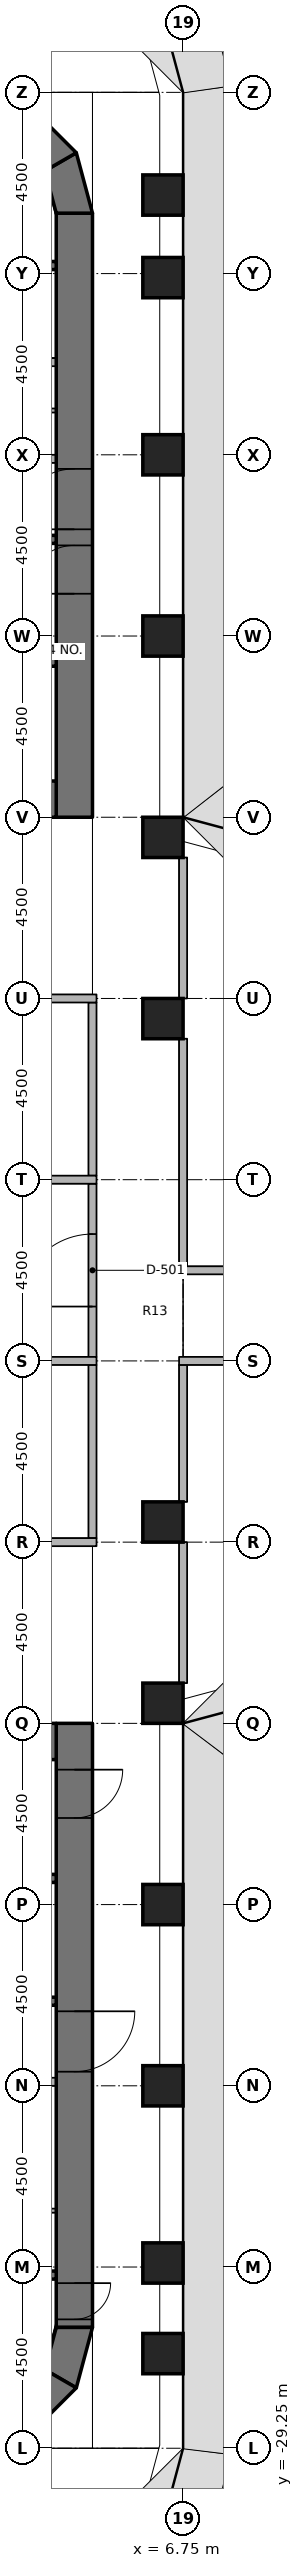
"""IFC4 building model, lengths in metres.
Left out: names, types, materials, properties, quantities, classifications, styles, units other than length and angle.
Written with IfcOpenShell. Run it as: python <this file> out.ifc"""

import sys

from ifc_helpers import new_model, si_unit, direction, frame, frame_2d, origin, origin_2d, place, context, subcontext, project, spatial, polyline, rectangle, outline, extrude, element, fill, save


model = new_model("IFC4")
c1 = context("Model", 3, precision=1e-05, world=origin(), true_north=direction((0.0, 1.0)))
c2 = subcontext(c1, "Body", "Model", "MODEL_VIEW")
j1 = project(units=[si_unit("LENGTHUNIT", "METRE"), si_unit("PLANEANGLEUNIT", "RADIAN")], contexts=[c1])
p1 = place(None, origin())
s1 = spatial("IfcSite", under=j1, at=p1, CompositionType="ELEMENT")
p2 = place(p1, origin())
s2 = spatial("IfcBuilding", under=s1, at=p2, CompositionType="ELEMENT")
p3 = place(p2, frame((0.0, 0.0, 69.0)))
s3 = spatial("IfcBuildingStorey", under=s2, at=p3, CompositionType="ELEMENT", Elevation=69.0)
for number, where, z_axis, x_axis in (
    (1, (6.25, -26.9, 0.0), (0.0, 0.0, 1.0), (1.0, 0.0, 0.0)),
    (2, (6.25, -24.65, 0.0), (0.0, 0.0, 1.0), (1.0, 0.0, 0.0)),
    (3, (6.25, -20.25, 0.0), (0.0, 0.0, 1.0), (1.0, 0.0, 0.0)),
    (4, (6.25, -15.75, 0.0), (0.0, 0.0, 1.0), (1.0, 0.0, 0.0)),
    (5, (6.25, -10.75, 0.0), (0.0, 0.0, 1.0), (1.0, 0.0, 0.0)),
    (6, (6.25, -6.25, 0.0), (0.0, 0.0, 1.0), (1.0, 0.0, 0.0)),
    (7, (6.25, 6.25, 0.0), (0.0, 0.0, 1.0), (1.0, 0.0, 0.0)),
    (8, (6.25, 10.75, 0.0), (0.0, 0.0, 1.0), (1.0, 0.0, 0.0)),
    (9, (6.25, 15.75, 0.0), (0.0, 0.0, 1.0), (1.0, 0.0, 0.0)),
    (10, (6.25, 20.25, 0.0), (0.0, 0.0, 1.0), (1.0, 0.0, 0.0)),
    (11, (6.25, 24.65, 0.0), (0.0, 0.0, 1.0), (1.0, 0.0, 0.0)),
    (12, (6.25, 26.7, 0.0), (0.0, 0.0, 1.0), (1.0, 0.0, 0.0)),
):
    element("IfcColumn", number, at=place(p3, frame(where, z_axis=z_axis, x_axis=x_axis)), inside=s3, PredefinedType="COLUMN", context=c2, shape_type="SweptSolid", body=[
        extrude(rectangle(XDim=1.0, YDim=1.0, at=origin_2d()), origin(), (0.0, 0.0, 1.0), 4.05),
    ])
p4 = place(p3, frame((4.05, 11.25, 0.0), z_axis=(0.0, 0.0, 1.0), x_axis=(0.0, 1.0, 0.0)))
e13 = element("IfcWall", 13, at=p4, inside=s3, PredefinedType="SHEAR", context=c2, shape_type="SweptSolid", body=[
    extrude(rectangle(XDim=15.0, YDim=0.9, at=frame_2d((7.5, 0.0))), origin(), (0.0, 0.0, 1.0), 4.2),
])
p5 = place(p4, frame((7.15, 0.0, 0.0)))
e14 = element("IfcOpeningElement", 14, at=p5, cuts=e13, PredefinedType="OPENING", context=c2, shape_type="SweptSolid", body=[
    extrude(rectangle(XDim=1.5, YDim=2.3, at=frame_2d((0.75, 1.15))), frame((0.0, 0.46, 0.0), z_axis=(0.0, -1.0, 0.0), x_axis=(1.0, 0.0, 0.0)), (0.0, 0.0, 1.0), 0.92),
])
p6 = place(p4, frame((5.55, 0.0, 0.0)))
e15 = element("IfcOpeningElement", 15, at=p6, cuts=e13, PredefinedType="OPENING", context=c2, shape_type="SweptSolid", body=[
    extrude(rectangle(XDim=1.2, YDim=2.1, at=frame_2d((0.6, 1.05))), frame((0.0, 0.46, 0.0), z_axis=(0.0, -1.0, 0.0), x_axis=(1.0, 0.0, 0.0)), (0.0, 0.0, 1.0), 0.92),
])
p7 = place(p3, frame((-3.6, 11.7, 0.0), z_axis=(0.0, 0.0, 1.0), x_axis=(1.0, 0.0, 0.0)))
e16 = element("IfcWall", 16, at=p7, inside=s3, PredefinedType="SHEAR", context=c2, shape_type="SweptSolid", body=[
    extrude(rectangle(XDim=7.2, YDim=0.9, at=frame_2d((3.6, 0.0))), origin(), (0.0, 0.0, 1.0), 4.2),
])
p8 = place(p3, origin())
e17 = element("IfcWall", 17, at=p8, inside=s3, PredefinedType="SHEAR", context=c2, shape_type="SweptSolid", body=[
    extrude(outline(polyline([(4.5, 26.25), (4.098, 27.75), (3.319, 27.3), (3.6, 26.25), (4.5, 26.25)])), origin(), (0.0, 0.0, 1.0), 4.2),
])
p9 = place(p3, origin())
e18 = element("IfcWall", 18, at=p9, inside=s3, PredefinedType="SHEAR", context=c2, shape_type="SweptSolid", body=[
    extrude(outline(polyline([(4.098, 27.75), (3.0, 28.848), (2.55, 28.069), (3.319, 27.3), (4.098, 27.75)])), origin(), (0.0, 0.0, 1.0), 4.2),
])
p10 = place(p3, frame((4.05, -11.25, 0.0), z_axis=(0.0, 0.0, 1.0), x_axis=(0.0, -1.0, 0.0)))
e19 = element("IfcWall", 19, at=p10, inside=s3, PredefinedType="SHEAR", context=c2, shape_type="SweptSolid", body=[
    extrude(rectangle(XDim=15.0, YDim=0.9, at=frame_2d((7.5, 0.0))), origin(), (0.0, 0.0, 1.0), 4.2),
])
p11 = place(p10, frame((7.15, 0.0, 0.0)))
e20 = element("IfcOpeningElement", 20, at=p11, cuts=e19, PredefinedType="OPENING", context=c2, shape_type="SweptSolid", body=[
    extrude(rectangle(XDim=1.5, YDim=2.3, at=frame_2d((0.75, 1.15))), frame((0.0, 0.46, 0.0), z_axis=(0.0, -1.0, 0.0), x_axis=(1.0, 0.0, 0.0)), (0.0, 0.0, 1.0), 0.92),
])
p12 = place(p10, frame((13.9, 0.0, 0.0)))
e21 = element("IfcOpeningElement", 21, at=p12, cuts=e19, PredefinedType="OPENING", context=c2, shape_type="SweptSolid", body=[
    extrude(rectangle(XDim=0.9, YDim=2.1, at=frame_2d((0.45, 1.05))), frame((0.0, 0.46, 0.0), z_axis=(0.0, -1.0, 0.0), x_axis=(1.0, 0.0, 0.0)), (0.0, 0.0, 1.0), 0.92),
])
p13 = place(p10, frame((1.15, 0.0, 0.0)))
e22 = element("IfcOpeningElement", 22, at=p13, cuts=e19, PredefinedType="OPENING", context=c2, shape_type="SweptSolid", body=[
    extrude(rectangle(XDim=1.2, YDim=2.1, at=frame_2d((0.6, 1.05))), frame((0.0, 0.46, 0.0), z_axis=(0.0, -1.0, 0.0), x_axis=(1.0, 0.0, 0.0)), (0.0, 0.0, 1.0), 0.92),
])
p14 = place(p3, frame((-3.6, -11.7, 0.0), z_axis=(0.0, 0.0, 1.0), x_axis=(1.0, 0.0, 0.0)))
e23 = element("IfcWall", 23, at=p14, inside=s3, PredefinedType="SHEAR", context=c2, shape_type="SweptSolid", body=[
    extrude(rectangle(XDim=7.2, YDim=0.9, at=frame_2d((3.6, 0.0))), origin(), (0.0, 0.0, 1.0), 4.2),
])
p15 = place(p3, origin())
e24 = element("IfcWall", 24, at=p15, inside=s3, PredefinedType="SHEAR", context=c2, shape_type="SweptSolid", body=[
    extrude(outline(polyline([(4.5, -26.25), (4.098, -27.75), (3.319, -27.3), (3.6, -26.25), (4.5, -26.25)])), origin(), (0.0, 0.0, 1.0), 4.2),
])
p16 = place(p3, origin())
e25 = element("IfcWall", 25, at=p16, inside=s3, PredefinedType="SHEAR", context=c2, shape_type="SweptSolid", body=[
    extrude(outline(polyline([(4.098, -27.75), (3.0, -28.848), (2.55, -28.069), (3.319, -27.3), (4.098, -27.75)])), origin(), (0.0, 0.0, 1.0), 4.2),
])
for number, where, z_axis, x_axis in (
    (26, (-3.6, 24.95, 0.0), (0.0, 0.0, 1.0), (1.0, 0.0, 0.0)),
    (27, (-3.6, 18.15, 0.0), (0.0, 0.0, 1.0), (1.0, 0.0, 0.0)),
    (28, (-3.6, 15.1, 0.0), (0.0, 0.0, 1.0), (1.0, 0.0, 0.0)),
):
    element("IfcWall", number, at=place(p3, frame(where, z_axis=z_axis, x_axis=x_axis)), inside=s3, PredefinedType="SHEAR", context=c2, shape_type="SweptSolid", body=[
        extrude(rectangle(XDim=7.2, YDim=0.2, at=frame_2d((3.6, 0.0))), origin(), (0.0, 0.0, 1.0), 4.05),
    ])
p17 = place(p3, frame((0.9, 20.15, 0.0), z_axis=(0.0, 0.0, 1.0), x_axis=(1.0, 0.0, 0.0)))
e29 = element("IfcWall", 29, at=p17, inside=s3, PredefinedType="PARTITIONING", context=c2, shape_type="SweptSolid", body=[
    extrude(rectangle(XDim=2.7, YDim=0.2, at=frame_2d((1.35, 0.0))), origin(), (0.0, 0.0, 1.0), 4.05),
])
p18 = place(p3, frame((1.1, 22.55, 0.0), z_axis=(0.0, 0.0, 1.0), x_axis=(1.0, 0.0, 0.0)))
e30 = element("IfcWall", 30, at=p18, inside=s3, PredefinedType="PARTITIONING", context=c2, shape_type="SweptSolid", body=[
    extrude(rectangle(XDim=2.5, YDim=0.2, at=frame_2d((1.25, 0.0))), origin(), (0.0, 0.0, 1.0), 4.05),
])
p19 = place(p3, frame((1.1, 21.35, 0.0), z_axis=(0.0, 0.0, 1.0), x_axis=(1.0, 0.0, 0.0)))
e31 = element("IfcWall", 31, at=p19, inside=s3, PredefinedType="PARTITIONING", context=c2, shape_type="SweptSolid", body=[
    extrude(rectangle(XDim=2.5, YDim=0.1, at=frame_2d((1.25, 0.0))), origin(), (0.0, 0.0, 1.0), 4.05),
])
for number, where, z_axis, x_axis in (
    (32, (3.6, -24.95, 0.0), (0.0, 0.0, 1.0), (-1.0, 0.0, 0.0)),
    (33, (3.6, -18.15, 0.0), (0.0, 0.0, 1.0), (-1.0, 0.0, 0.0)),
    (34, (3.6, -15.1, 0.0), (0.0, 0.0, 1.0), (-1.0, 0.0, 0.0)),
):
    element("IfcWall", number, at=place(p3, frame(where, z_axis=z_axis, x_axis=x_axis)), inside=s3, PredefinedType="SHEAR", context=c2, shape_type="SweptSolid", body=[
        extrude(rectangle(XDim=7.2, YDim=0.2, at=frame_2d((3.6, 0.0))), origin(), (0.0, 0.0, 1.0), 4.05),
    ])
p20 = place(p3, frame((3.6, -20.15, 0.0), z_axis=(0.0, 0.0, 1.0), x_axis=(-1.0, 0.0, 0.0)))
e35 = element("IfcWall", 35, at=p20, inside=s3, PredefinedType="PARTITIONING", context=c2, shape_type="SweptSolid", body=[
    extrude(rectangle(XDim=2.7, YDim=0.2, at=frame_2d((1.35, 0.0))), origin(), (0.0, 0.0, 1.0), 4.05),
])
p21 = place(p3, frame((3.6, -23.35, 0.0), z_axis=(0.0, 0.0, 1.0), x_axis=(-1.0, 0.0, 0.0)))
e36 = element("IfcWall", 36, at=p21, inside=s3, PredefinedType="PARTITIONING", context=c2, shape_type="SweptSolid", body=[
    extrude(rectangle(XDim=2.5, YDim=0.1, at=frame_2d((1.25, 0.0))), origin(), (0.0, 0.0, 1.0), 4.05),
])
p22 = place(p3, frame((4.5, 2.35, 0.0), z_axis=(0.0, 0.0, 1.0), x_axis=(0.0, 1.0, 0.0)))
e37 = element("IfcWall", 37, at=p22, inside=s3, PredefinedType="PARTITIONING", context=c2, shape_type="SweptSolid", body=[
    extrude(rectangle(XDim=4.3, YDim=0.2, at=frame_2d((2.15, 0.0))), origin(), (0.0, 0.0, 1.0), 3.131),
])
p23 = place(p3, frame((4.5, -2.15, 0.0), z_axis=(0.0, 0.0, 1.0), x_axis=(0.0, 1.0, 0.0)))
e38 = element("IfcWall", 38, at=p23, inside=s3, PredefinedType="PARTITIONING", context=c2, shape_type="SweptSolid", body=[
    extrude(rectangle(XDim=4.3, YDim=0.2, at=frame_2d((2.15, 0.0))), origin(), (0.0, 0.0, 1.0), 3.131),
])
p24 = place(p23, frame((1.25, 0.0, 0.0)))
e39 = element("IfcOpeningElement", 39, at=p24, cuts=e38, PredefinedType="OPENING", context=c2, shape_type="SweptSolid", body=[
    extrude(rectangle(XDim=1.8, YDim=2.1, at=frame_2d((0.9, 1.05))), frame((0.0, 0.11, 0.0), z_axis=(0.0, -1.0, 0.0), x_axis=(1.0, 0.0, 0.0)), (0.0, 0.0, 1.0), 0.22),
])
p25 = place(p3, frame((4.5, -6.65, 0.0), z_axis=(0.0, 0.0, 1.0), x_axis=(0.0, 1.0, 0.0)))
e40 = element("IfcWall", 40, at=p25, inside=s3, PredefinedType="PARTITIONING", context=c2, shape_type="SweptSolid", body=[
    extrude(rectangle(XDim=4.3, YDim=0.2, at=frame_2d((2.15, 0.0))), origin(), (0.0, 0.0, 1.0), 3.131),
])
p26 = place(p3, frame((6.75, 0.1, 0.0), z_axis=(0.0, 0.0, 1.0), x_axis=(0.0, 1.0, 0.0)))
e41 = element("IfcWall", 41, at=p26, inside=s3, PredefinedType="PARTITIONING", context=c2, shape_type="SweptSolid", body=[
    extrude(rectangle(XDim=5.65, YDim=0.2, at=frame_2d((2.825, 0.0))), origin(), (0.0, 0.0, 1.0), 3.131),
])
for number, where, z_axis, x_axis in (
    (42, (6.75, 6.75, 0.0), (0.0, 0.0, 1.0), (0.0, 1.0, 0.0)),
    (43, (6.75, -10.25, 0.0), (0.0, 0.0, 1.0), (0.0, 1.0, 0.0)),
):
    element("IfcWall", number, at=place(p3, frame(where, z_axis=z_axis, x_axis=x_axis)), inside=s3, PredefinedType="PARTITIONING", context=c2, shape_type="SweptSolid", body=[
        extrude(rectangle(XDim=3.5, YDim=0.2, at=frame_2d((1.75, 0.0))), origin(), (0.0, 0.0, 1.0), 3.131),
    ])
p27 = place(p3, frame((6.75, -5.75, 0.0), z_axis=(0.0, 0.0, 1.0), x_axis=(0.0, 1.0, 0.0)))
e44 = element("IfcWall", 44, at=p27, inside=s3, PredefinedType="PARTITIONING", context=c2, shape_type="SweptSolid", body=[
    extrude(rectangle(XDim=3.4, YDim=0.2, at=frame_2d((1.7, 0.0))), origin(), (0.0, 0.0, 1.0), 3.131),
])
p28 = place(p3, frame((4.6, 6.75, 0.0), z_axis=(0.0, 0.0, 1.0), x_axis=(-1.0, 0.0, 0.0)))
e45 = element("IfcWall", 45, at=p28, inside=s3, PredefinedType="PARTITIONING", context=c2, shape_type="SweptSolid", body=[
    extrude(rectangle(XDim=9.2, YDim=0.2, at=frame_2d((4.6, 0.0))), origin(), (0.0, 0.0, 1.0), 3.131),
])
p29 = place(p28, frame((4.1, 0.0, 0.0)))
e46 = element("IfcOpeningElement", 46, at=p29, cuts=e45, PredefinedType="OPENING", context=c2, shape_type="SweptSolid", body=[
    extrude(rectangle(XDim=1.0, YDim=2.1, at=frame_2d((0.5, 1.05))), frame((0.0, 0.11, 0.0), z_axis=(0.0, -1.0, 0.0), x_axis=(1.0, 0.0, 0.0)), (0.0, 0.0, 1.0), 0.22),
])
p30 = place(p3, frame((-4.6, -6.75, 0.0), z_axis=(0.0, 0.0, 1.0), x_axis=(1.0, 0.0, 0.0)))
e47 = element("IfcWall", 47, at=p30, inside=s3, PredefinedType="PARTITIONING", context=c2, shape_type="SweptSolid", body=[
    extrude(rectangle(XDim=9.2, YDim=0.2, at=frame_2d((4.6, 0.0))), origin(), (0.0, 0.0, 1.0), 3.131),
])
p31 = place(p30, frame((4.1, 0.0, 0.0)))
e48 = element("IfcOpeningElement", 48, at=p31, cuts=e47, PredefinedType="OPENING", context=c2, shape_type="SweptSolid", body=[
    extrude(rectangle(XDim=1.0, YDim=2.1, at=frame_2d((0.5, 1.05))), frame((0.0, 0.11, 0.0), z_axis=(0.0, -1.0, 0.0), x_axis=(1.0, 0.0, 0.0)), (0.0, 0.0, 1.0), 0.22),
])
for number, where, z_axis, x_axis in (
    (49, (-4.6, 2.25, 0.0), (0.0, 0.0, 1.0), (1.0, 0.0, 0.0)),
    (50, (-4.6, -2.25, 0.0), (0.0, 0.0, 1.0), (1.0, 0.0, 0.0)),
):
    element("IfcWall", number, at=place(p3, frame(where, z_axis=z_axis, x_axis=x_axis)), inside=s3, PredefinedType="PARTITIONING", context=c2, shape_type="SweptSolid", body=[
        extrude(rectangle(XDim=9.2, YDim=0.2, at=frame_2d((4.6, 0.0))), origin(), (0.0, 0.0, 1.0), 3.131),
    ])
p32 = place(p3, frame((6.65, 0.0, 0.0), z_axis=(0.0, 0.0, 1.0), x_axis=(1.0, 0.0, 0.0)))
e51 = element("IfcWall", 51, at=p32, inside=s3, PredefinedType="PARTITIONING", context=c2, shape_type="SweptSolid", body=[
    extrude(rectangle(XDim=4.7, YDim=0.2, at=frame_2d((2.35, 0.0))), origin(), (0.0, 0.0, 1.0), 3.131),
])
p33 = place(p32, frame((1.85, 0.0, 0.0)))
e52 = element("IfcOpeningElement", 52, at=p33, cuts=e51, PredefinedType="OPENING", context=c2, shape_type="SweptSolid", body=[
    extrude(rectangle(XDim=1.0, YDim=2.1, at=frame_2d((0.5, 1.05))), frame((0.0, 0.11, 0.0), z_axis=(0.0, -1.0, 0.0), x_axis=(1.0, 0.0, 0.0)), (0.0, 0.0, 1.0), 0.22),
])
p34 = place(p3, frame((11.35, -2.25, 0.0), z_axis=(0.0, 0.0, 1.0), x_axis=(-1.0, 0.0, 0.0)))
e53 = element("IfcWall", 53, at=p34, inside=s3, PredefinedType="PARTITIONING", context=c2, shape_type="SweptSolid", body=[
    extrude(rectangle(XDim=4.7, YDim=0.2, at=frame_2d((2.35, 0.0))), origin(), (0.0, 0.0, 1.0), 3.131),
])
p35 = place(p34, frame((1.85, 0.0, 0.0)))
e54 = element("IfcOpeningElement", 54, at=p35, cuts=e53, PredefinedType="OPENING", context=c2, shape_type="SweptSolid", body=[
    extrude(rectangle(XDim=1.0, YDim=2.1, at=frame_2d((0.5, 1.05))), frame((0.0, 0.11, 0.0), z_axis=(0.0, -1.0, 0.0), x_axis=(1.0, 0.0, 0.0)), (0.0, 0.0, 1.0), 0.22),
])
p36 = place(p5, origin())
e55 = element("IfcDoor", 55, at=p36, inside=s3, OperationType="DOUBLE_DOOR_SINGLE_SWING", PredefinedType="DOOR", context=c2, shape_type="SweptSolid", body=[
    extrude(rectangle(XDim=1.5, YDim=2.3, at=frame_2d((0.75, 1.15))), frame((0.0, 0.025, 0.0), z_axis=(0.0, -1.0, 0.0), x_axis=(1.0, 0.0, 0.0)), (0.0, 0.0, 1.0), 0.05),
])
fill(e14, e55)
p37 = place(p6, origin())
e56 = element("IfcDoor", 56, at=p37, inside=s3, OperationType="SINGLE_SWING_LEFT", PredefinedType="DOOR", context=c2, shape_type="SweptSolid", body=[
    extrude(rectangle(XDim=1.2, YDim=2.1, at=frame_2d((0.6, 1.05))), frame((0.0, 0.025, 0.0), z_axis=(0.0, -1.0, 0.0), x_axis=(1.0, 0.0, 0.0)), (0.0, 0.0, 1.0), 0.05),
])
fill(e15, e56)
p38 = place(p11, origin())
e57 = element("IfcDoor", 57, at=p38, inside=s3, OperationType="DOUBLE_DOOR_SINGLE_SWING", PredefinedType="DOOR", context=c2, shape_type="SweptSolid", body=[
    extrude(rectangle(XDim=1.5, YDim=2.3, at=frame_2d((0.75, 1.15))), frame((0.0, 0.025, 0.0), z_axis=(0.0, -1.0, 0.0), x_axis=(1.0, 0.0, 0.0)), (0.0, 0.0, 1.0), 0.05),
])
fill(e20, e57)
p39 = place(p12, origin())
e58 = element("IfcDoor", 58, at=p39, inside=s3, OperationType="SINGLE_SWING_LEFT", PredefinedType="DOOR", context=c2, shape_type="SweptSolid", body=[
    extrude(rectangle(XDim=0.9, YDim=2.1, at=frame_2d((0.45, 1.05))), frame((0.0, 0.025, 0.0), z_axis=(0.0, -1.0, 0.0), x_axis=(1.0, 0.0, 0.0)), (0.0, 0.0, 1.0), 0.05),
])
fill(e21, e58)
p40 = place(p13, origin())
e59 = element("IfcDoor", 59, at=p40, inside=s3, OperationType="SINGLE_SWING_LEFT", PredefinedType="DOOR", context=c2, shape_type="SweptSolid", body=[
    extrude(rectangle(XDim=1.2, YDim=2.1, at=frame_2d((0.6, 1.05))), frame((0.0, 0.025, 0.0), z_axis=(0.0, -1.0, 0.0), x_axis=(1.0, 0.0, 0.0)), (0.0, 0.0, 1.0), 0.05),
])
fill(e22, e59)
p41 = place(p24, origin())
e60 = element("IfcDoor", 60, at=p41, inside=s3, OperationType="DOUBLE_DOOR_SINGLE_SWING", PredefinedType="DOOR", context=c2, shape_type="SweptSolid", body=[
    extrude(rectangle(XDim=1.8, YDim=2.1, at=frame_2d((0.9, 1.05))), frame((0.0, 0.025, 0.0), z_axis=(0.0, -1.0, 0.0), x_axis=(1.0, 0.0, 0.0)), (0.0, 0.0, 1.0), 0.05),
])
fill(e39, e60)
save(model, sys.argv[1])
